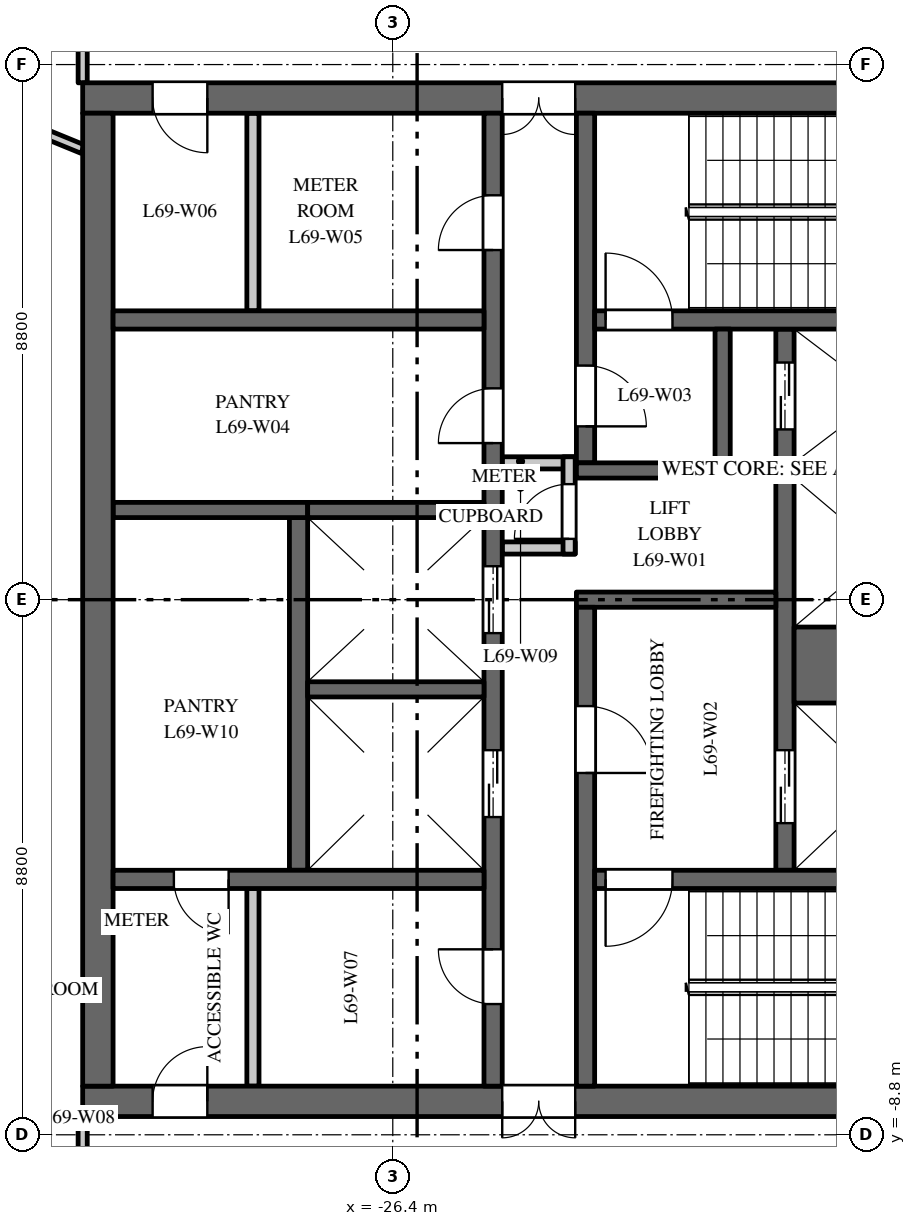
"""IFC4 building model, lengths in metres.
Left out: names, types, materials, properties, quantities, classifications, styles, units other than length and angle.
Written with IfcOpenShell. Run it as: python <this file> out.ifc"""

import sys

from ifc_helpers import new_model, si_unit, direction, frame, frame_2d, origin, place, context, subcontext, project, spatial, rectangle, extrude, element, fill, save


model = new_model("IFC4")
c1 = context("Model", 3, precision=1e-05, world=origin(), true_north=direction((0.0, 1.0)))
c2 = subcontext(c1, "Body", "Model", "MODEL_VIEW")
j1 = project(units=[si_unit("LENGTHUNIT", "METRE"), si_unit("PLANEANGLEUNIT", "RADIAN")], contexts=[c1])
p1 = place(None, origin())
s1 = spatial("IfcSite", under=j1, at=p1, CompositionType="ELEMENT")
p2 = place(p1, origin())
s2 = spatial("IfcBuilding", under=s1, at=p2, CompositionType="ELEMENT")
p3 = place(p2, frame((0.0, 0.0, 319.0)))
s3 = spatial("IfcBuildingStorey", under=s2, at=p3, CompositionType="ELEMENT", Elevation=319.0)
p4 = place(p3, frame((-16.5, 8.25, 0.0), z_axis=(0.0, 0.0, 1.0), x_axis=(-1.0, 0.0, 0.0)))
e1 = element("IfcWall", 1, at=p4, inside=s3, PredefinedType="SHEAR", context=c2, shape_type="SweptSolid", body=[
    extrude(rectangle(XDim=15.0, YDim=0.5, at=frame_2d((7.5, 0.0))), origin(), (0.0, 0.0, 1.0), 3.7),
])
p5 = place(p4, frame((6.9, 0.0, 0.0)))
e2 = element("IfcOpeningElement", 2, at=p5, cuts=e1, PredefinedType="OPENING", context=c2, shape_type="SweptSolid", body=[
    extrude(rectangle(XDim=1.2, YDim=2.1, at=frame_2d((0.6, 1.05))), frame((0.0, 0.26, 0.0), z_axis=(0.0, -1.0, 0.0), x_axis=(1.0, 0.0, 0.0)), (0.0, 0.0, 1.0), 0.52),
])
p6 = place(p4, frame((12.95, 0.0, 0.0)))
e3 = element("IfcOpeningElement", 3, at=p6, cuts=e1, PredefinedType="OPENING", context=c2, shape_type="SweptSolid", body=[
    extrude(rectangle(XDim=0.9, YDim=2.1, at=frame_2d((0.45, 1.05))), frame((0.0, 0.26, 0.0), z_axis=(0.0, -1.0, 0.0), x_axis=(1.0, 0.0, 0.0)), (0.0, 0.0, 1.0), 0.52),
])
p7 = place(p3, frame((-16.5, -8.25, 0.0), z_axis=(0.0, 0.0, 1.0), x_axis=(-1.0, 0.0, 0.0)))
e4 = element("IfcWall", 4, at=p7, inside=s3, PredefinedType="SHEAR", context=c2, shape_type="SweptSolid", body=[
    extrude(rectangle(XDim=15.0, YDim=0.5, at=frame_2d((7.5, 0.0))), origin(), (0.0, 0.0, 1.0), 3.7),
])
p8 = place(p7, frame((6.9, 0.0, 0.0)))
e5 = element("IfcOpeningElement", 5, at=p8, cuts=e4, PredefinedType="OPENING", context=c2, shape_type="SweptSolid", body=[
    extrude(rectangle(XDim=1.2, YDim=2.1, at=frame_2d((0.6, 1.05))), frame((0.0, 0.26, 0.0), z_axis=(0.0, -1.0, 0.0), x_axis=(1.0, 0.0, 0.0)), (0.0, 0.0, 1.0), 0.52),
])
p9 = place(p7, frame((12.95, 0.0, 0.0)))
e6 = element("IfcOpeningElement", 6, at=p9, cuts=e4, PredefinedType="OPENING", context=c2, shape_type="SweptSolid", body=[
    extrude(rectangle(XDim=0.9, YDim=2.1, at=frame_2d((0.45, 1.05))), frame((0.0, 0.26, 0.0), z_axis=(0.0, -1.0, 0.0), x_axis=(1.0, 0.0, 0.0)), (0.0, 0.0, 1.0), 0.52),
])
p10 = place(p3, frame((-27.95, -4.45, 0.0), z_axis=(0.0, 0.0, 1.0), x_axis=(0.0, 1.0, 0.0)))
e7 = element("IfcWall", 7, at=p10, inside=s3, PredefinedType="SHEAR", context=c2, shape_type="SweptSolid", body=[
    extrude(rectangle(XDim=5.8, YDim=0.3, at=frame_2d((2.9, 0.0))), origin(), (0.0, 0.0, 1.0), 3.7),
])
p11 = place(p3, frame((-27.8, 1.475, 0.0), z_axis=(0.0, 0.0, 1.0), x_axis=(-1.0, 0.0, 0.0)))
e8 = element("IfcWall", 8, at=p11, inside=s3, PredefinedType="SHEAR", context=c2, shape_type="SweptSolid", body=[
    extrude(rectangle(XDim=3.2, YDim=0.25, at=frame_2d((1.6, 0.0))), origin(), (0.0, 0.0, 1.0), 3.7),
])
p12 = place(p3, frame((-19.95, -4.45, 0.0), z_axis=(0.0, 0.0, 1.0), x_axis=(0.0, 1.0, 0.0)))
e9 = element("IfcWall", 9, at=p12, inside=s3, PredefinedType="SHEAR", context=c2, shape_type="SweptSolid", body=[
    extrude(rectangle(XDim=8.9, YDim=0.3, at=frame_2d((4.45, 0.0))), origin(), (0.0, 0.0, 1.0), 3.7),
])
p13 = place(p12, frame((0.775, 0.0, 0.0)))
e10 = element("IfcOpeningElement", 10, at=p13, cuts=e9, PredefinedType="OPENING", context=c2, shape_type="SweptSolid", body=[
    extrude(rectangle(XDim=1.2, YDim=2.1, at=frame_2d((0.6, 1.05))), frame((0.0, 0.16, 0.0), z_axis=(0.0, -1.0, 0.0), x_axis=(1.0, 0.0, 0.0)), (0.0, 0.0, 1.0), 0.32),
])
p14 = place(p12, frame((7.25, 0.0, 0.0)))
e11 = element("IfcOpeningElement", 11, at=p14, cuts=e9, PredefinedType="OPENING", context=c2, shape_type="SweptSolid", body=[
    extrude(rectangle(XDim=1.1, YDim=2.1, at=frame_2d((0.55, 1.05))), frame((0.0, 0.16, 0.0), z_axis=(0.0, -1.0, 0.0), x_axis=(1.0, 0.0, 0.0)), (0.0, 0.0, 1.0), 0.32),
])
p15 = place(p3, frame((-24.75, -8.0, 0.0), z_axis=(0.0, 0.0, 1.0), x_axis=(0.0, 1.0, 0.0)))
e12 = element("IfcWall", 12, at=p15, inside=s3, PredefinedType="SHEAR", context=c2, shape_type="SweptSolid", body=[
    extrude(rectangle(XDim=16.0, YDim=0.3, at=frame_2d((8.0, 0.0))), origin(), (0.0, 0.0, 1.0), 3.7),
])
p16 = place(p15, frame((4.425, 0.0, 0.0)))
e13 = element("IfcOpeningElement", 13, at=p16, cuts=e12, PredefinedType="OPENING", context=c2, shape_type="SweptSolid", body=[
    extrude(rectangle(XDim=1.1, YDim=2.1, at=frame_2d((0.55, 1.05))), frame((0.0, 0.16, 0.0), z_axis=(0.0, -1.0, 0.0), x_axis=(1.0, 0.0, 0.0)), (0.0, 0.0, 1.0), 0.32),
])
p17 = place(p15, frame((7.45, 0.0, 0.0)))
e14 = element("IfcOpeningElement", 14, at=p17, cuts=e12, PredefinedType="OPENING", context=c2, shape_type="SweptSolid", body=[
    extrude(rectangle(XDim=1.1, YDim=2.1, at=frame_2d((0.55, 1.05))), frame((0.0, 0.16, 0.0), z_axis=(0.0, -1.0, 0.0), x_axis=(1.0, 0.0, 0.0)), (0.0, 0.0, 1.0), 0.32),
])
p18 = place(p15, frame((10.575, 0.0, 0.0)))
e15 = element("IfcOpeningElement", 15, at=p18, cuts=e12, PredefinedType="OPENING", context=c2, shape_type="SweptSolid", body=[
    extrude(rectangle(XDim=0.9, YDim=2.1, at=frame_2d((0.45, 1.05))), frame((0.0, 0.16, 0.0), z_axis=(0.0, -1.0, 0.0), x_axis=(1.0, 0.0, 0.0)), (0.0, 0.0, 1.0), 0.32),
])
p19 = place(p15, frame((13.75, 0.0, 0.0)))
e16 = element("IfcOpeningElement", 16, at=p19, cuts=e12, PredefinedType="OPENING", context=c2, shape_type="SweptSolid", body=[
    extrude(rectangle(XDim=0.9, YDim=2.1, at=frame_2d((0.45, 1.05))), frame((0.0, 0.16, 0.0), z_axis=(0.0, -1.0, 0.0), x_axis=(1.0, 0.0, 0.0)), (0.0, 0.0, 1.0), 0.32),
])
p20 = place(p15, frame((1.35, 0.0, 0.0)))
e17 = element("IfcOpeningElement", 17, at=p20, cuts=e12, PredefinedType="OPENING", context=c2, shape_type="SweptSolid", body=[
    extrude(rectangle(XDim=0.9, YDim=2.1, at=frame_2d((0.45, 1.05))), frame((0.0, 0.16, 0.0), z_axis=(0.0, -1.0, 0.0), x_axis=(1.0, 0.0, 0.0)), (0.0, 0.0, 1.0), 0.32),
])
p21 = place(p3, frame((-20.1, 0.0, 0.0), z_axis=(0.0, 0.0, 1.0), x_axis=(-1.0, 0.0, 0.0)))
e18 = element("IfcWall", 18, at=p21, inside=s3, PredefinedType="SHEAR", context=c2, shape_type="SweptSolid", body=[
    extrude(rectangle(XDim=3.28, YDim=0.25, at=frame_2d((1.64, 0.0))), origin(), (0.0, 0.0, 1.0), 3.7),
])
for number, where, z_axis, x_axis in (
    (19, (-23.4, 0.85, 0.0), (0.0, 0.0, 1.0), (-1.0, 0.0, 0.0)),
    (20, (-23.4, 2.25, 0.0), (0.0, 0.0, 1.0), (-1.0, 0.0, 0.0)),
):
    element("IfcWall", number, at=place(p3, frame(where, z_axis=z_axis, x_axis=x_axis)), inside=s3, PredefinedType="PARTITIONING", context=c2, shape_type="SweptSolid", body=[
        extrude(rectangle(XDim=1.2, YDim=0.2, at=frame_2d((0.6, 0.0))), origin(), (0.0, 0.0, 1.0), 3.7),
    ])
p22 = place(p3, frame((-23.5, 0.75, 0.0), z_axis=(0.0, 0.0, 1.0), x_axis=(0.0, 1.0, 0.0)))
e21 = element("IfcWall", 21, at=p22, inside=s3, PredefinedType="PARTITIONING", context=c2, shape_type="SweptSolid", body=[
    extrude(rectangle(XDim=1.6, YDim=0.2, at=frame_2d((0.8, 0.0))), origin(), (0.0, 0.0, 1.0), 3.7),
])
p23 = place(p22, frame((0.25, 0.0, 0.0)))
e22 = element("IfcOpeningElement", 22, at=p23, cuts=e21, PredefinedType="OPENING", context=c2, shape_type="SweptSolid", body=[
    extrude(rectangle(XDim=0.9, YDim=2.1, at=frame_2d((0.45, 1.05))), frame((0.0, 0.11, 0.0), z_axis=(0.0, -1.0, 0.0), x_axis=(1.0, 0.0, 0.0)), (0.0, 0.0, 1.0), 0.22),
])
p24 = place(p3, frame((-31.25, -8.0, 0.0), z_axis=(0.0, 0.0, 1.0), x_axis=(0.0, 1.0, 0.0)))
e23 = element("IfcWall", 23, at=p24, inside=s3, PredefinedType="SHEAR", context=c2, shape_type="SweptSolid", body=[
    extrude(rectangle(XDim=16.0, YDim=0.5, at=frame_2d((8.0, 0.0))), origin(), (0.0, 0.0, 1.0), 3.7),
])
p25 = place(p3, frame((-24.9, 4.6, 0.0), z_axis=(0.0, 0.0, 1.0), x_axis=(-1.0, 0.0, 0.0)))
e24 = element("IfcWall", 24, at=p25, inside=s3, PredefinedType="SHEAR", context=c2, shape_type="SweptSolid", body=[
    extrude(rectangle(XDim=6.1, YDim=0.3, at=frame_2d((3.05, 0.0))), origin(), (0.0, 0.0, 1.0), 3.7),
])
for number, where, z_axis, x_axis in (
    (25, (-28.7, 4.75, 0.0), (0.0, 0.0, 1.0), (0.0, 1.0, 0.0)),
    (26, (-28.7, -8.0, 0.0), (0.0, 0.0, 1.0), (0.0, 1.0, 0.0)),
):
    element("IfcWall", number, at=place(p3, frame(where, z_axis=z_axis, x_axis=x_axis)), inside=s3, PredefinedType="PARTITIONING", context=c2, shape_type="SweptSolid", body=[
        extrude(rectangle(XDim=3.25, YDim=0.2, at=frame_2d((1.625, 0.0))), origin(), (0.0, 0.0, 1.0), 3.7),
    ])
p26 = place(p3, frame((-24.9, -4.6, 0.0), z_axis=(0.0, 0.0, 1.0), x_axis=(-1.0, 0.0, 0.0)))
e27 = element("IfcWall", 27, at=p26, inside=s3, PredefinedType="SHEAR", context=c2, shape_type="SweptSolid", body=[
    extrude(rectangle(XDim=6.1, YDim=0.3, at=frame_2d((3.05, 0.0))), origin(), (0.0, 0.0, 1.0), 3.7),
])
p27 = place(p26, frame((4.2, 0.0, 0.0)))
e28 = element("IfcOpeningElement", 28, at=p27, cuts=e27, PredefinedType="OPENING", context=c2, shape_type="SweptSolid", body=[
    extrude(rectangle(XDim=0.9, YDim=2.1, at=frame_2d((0.45, 1.05))), frame((0.0, 0.16, 0.0), z_axis=(0.0, -1.0, 0.0), x_axis=(1.0, 0.0, 0.0)), (0.0, 0.0, 1.0), 0.32),
])
p28 = place(p3, frame((-16.9, -1.075, 0.0), z_axis=(0.0, 0.0, 1.0), x_axis=(-1.0, 0.0, 0.0)))
e29 = element("IfcWall", 29, at=p28, inside=s3, PredefinedType="SHEAR", context=c2, shape_type="SweptSolid", body=[
    extrude(rectangle(XDim=2.9, YDim=1.25, at=frame_2d((1.45, 0.0))), origin(), (0.0, 0.0, 1.0), 3.7),
])
for number, where, z_axis, x_axis in (
    (30, (-16.9, 2.125, 0.0), (0.0, 0.0, 1.0), (-1.0, 0.0, 0.0)),
    (31, (-24.9, -1.475, 0.0), (0.0, 0.0, 1.0), (-1.0, 0.0, 0.0)),
    (32, (-24.9, 1.475, 0.0), (0.0, 0.0, 1.0), (-1.0, 0.0, 0.0)),
):
    element("IfcWall", number, at=place(p3, frame(where, z_axis=z_axis, x_axis=x_axis)), inside=s3, PredefinedType="SHEAR", context=c2, shape_type="SweptSolid", body=[
        extrude(rectangle(XDim=2.9, YDim=0.25, at=frame_2d((1.45, 0.0))), origin(), (0.0, 0.0, 1.0), 3.7),
    ])
p29 = place(p3, frame((-23.23, 2.25, 0.0), z_axis=(0.0, 0.0, 1.0), x_axis=(0.0, 1.0, 0.0)))
e33 = element("IfcWall", 33, at=p29, inside=s3, PredefinedType="SHEAR", context=c2, shape_type="SweptSolid", body=[
    extrude(rectangle(XDim=5.75, YDim=0.3, at=frame_2d((2.875, 0.0))), origin(), (0.0, 0.0, 1.0), 3.7),
])
p30 = place(p29, frame((0.6, 0.0, 0.0)))
e34 = element("IfcOpeningElement", 34, at=p30, cuts=e33, PredefinedType="OPENING", context=c2, shape_type="SweptSolid", body=[
    extrude(rectangle(XDim=1.0, YDim=2.1, at=frame_2d((0.5, 1.05))), frame((0.0, 0.16, 0.0), z_axis=(0.0, -1.0, 0.0), x_axis=(1.0, 0.0, 0.0)), (0.0, 0.0, 1.0), 0.32),
])
p31 = place(p3, frame((-23.23, -8.0, 0.0), z_axis=(0.0, 0.0, 1.0), x_axis=(0.0, 1.0, 0.0)))
e35 = element("IfcWall", 35, at=p31, inside=s3, PredefinedType="SHEAR", context=c2, shape_type="SweptSolid", body=[
    extrude(rectangle(XDim=7.875, YDim=0.3, at=frame_2d((3.938, 0.0))), origin(), (0.0, 0.0, 1.0), 3.7),
])
p32 = place(p31, frame((5.15, 0.0, 0.0)))
e36 = element("IfcOpeningElement", 36, at=p32, cuts=e35, PredefinedType="OPENING", context=c2, shape_type="SweptSolid", body=[
    extrude(rectangle(XDim=1.1, YDim=2.1, at=frame_2d((0.55, 1.05))), frame((0.0, 0.16, 0.0), z_axis=(0.0, -1.0, 0.0), x_axis=(1.0, 0.0, 0.0)), (0.0, 0.0, 1.0), 0.32),
])
p33 = place(p3, frame((-16.9, 4.6, 0.0), z_axis=(0.0, 0.0, 1.0), x_axis=(-1.0, 0.0, 0.0)))
e37 = element("IfcWall", 37, at=p33, inside=s3, PredefinedType="SHEAR", context=c2, shape_type="SweptSolid", body=[
    extrude(rectangle(XDim=6.18, YDim=0.3, at=frame_2d((3.09, 0.0))), origin(), (0.0, 0.0, 1.0), 3.7),
])
p34 = place(p33, frame((4.9, 0.0, 0.0)))
e38 = element("IfcOpeningElement", 38, at=p34, cuts=e37, PredefinedType="OPENING", context=c2, shape_type="SweptSolid", body=[
    extrude(rectangle(XDim=1.1, YDim=2.1, at=frame_2d((0.55, 1.05))), frame((0.0, 0.16, 0.0), z_axis=(0.0, -1.0, 0.0), x_axis=(1.0, 0.0, 0.0)), (0.0, 0.0, 1.0), 0.32),
])
p35 = place(p3, frame((-16.9, -4.6, 0.0), z_axis=(0.0, 0.0, 1.0), x_axis=(-1.0, 0.0, 0.0)))
e39 = element("IfcWall", 39, at=p35, inside=s3, PredefinedType="SHEAR", context=c2, shape_type="SweptSolid", body=[
    extrude(rectangle(XDim=6.18, YDim=0.3, at=frame_2d((3.09, 0.0))), origin(), (0.0, 0.0, 1.0), 3.7),
])
p36 = place(p35, frame((4.9, 0.0, 0.0)))
e40 = element("IfcOpeningElement", 40, at=p36, cuts=e39, PredefinedType="OPENING", context=c2, shape_type="SweptSolid", body=[
    extrude(rectangle(XDim=1.1, YDim=2.1, at=frame_2d((0.55, 1.05))), frame((0.0, 0.16, 0.0), z_axis=(0.0, -1.0, 0.0), x_axis=(1.0, 0.0, 0.0)), (0.0, 0.0, 1.0), 0.32),
])
p37 = place(p3, frame((-20.85, 2.125, 0.0), z_axis=(0.0, 0.0, 1.0), x_axis=(-1.0, 0.0, 0.0)))
e41 = element("IfcWall", 41, at=p37, inside=s3, PredefinedType="SHEAR", context=c2, shape_type="SweptSolid", body=[
    extrude(rectangle(XDim=2.53, YDim=0.25, at=frame_2d((1.265, 0.0))), origin(), (0.0, 0.0, 1.0), 3.7),
])
p38 = place(p3, frame((-20.975, 2.25, 0.0), z_axis=(0.0, 0.0, 1.0), x_axis=(0.0, 1.0, 0.0)))
e42 = element("IfcWall", 42, at=p38, inside=s3, PredefinedType="SHEAR", context=c2, shape_type="SweptSolid", body=[
    extrude(rectangle(XDim=2.2, YDim=0.25, at=frame_2d((1.1, 0.0))), origin(), (0.0, 0.0, 1.0), 3.7),
])
p39 = place(p3, frame((-34.234, 8.53, 0.0), z_axis=(0.0, 0.0, 1.0), x_axis=(0.925344112436, -0.379128307542, 0.0)))
e43 = element("IfcWall", 43, at=p39, inside=s3, PredefinedType="PARTITIONING", context=c2, shape_type="SweptSolid", body=[
    extrude(rectangle(XDim=2.954, YDim=0.15, at=frame_2d((1.477, 0.0))), origin(), (0.0, 0.0, 1.0), 3.0),
])
for number, where, z_axis, x_axis in (
    (44, (-31.5, -10.7, 0.0), (0.0, 0.0, 1.0), (0.0, 1.0, 0.0)),
    (45, (-31.5, 8.5, 0.0), (0.0, 0.0, 1.0), (0.0, 1.0, 0.0)),
):
    element("IfcWall", number, at=place(p3, frame(where, z_axis=z_axis, x_axis=x_axis)), inside=s3, PredefinedType="PARTITIONING", context=c2, shape_type="SweptSolid", body=[
        extrude(rectangle(XDim=2.2, YDim=0.15, at=frame_2d((1.1, 0.0))), origin(), (0.0, 0.0, 1.0), 3.7),
    ])
p40 = place(p13, origin())
e46 = element("IfcDoor", 46, at=p40, inside=s3, OperationType="DOUBLE_DOOR_SLIDING", PredefinedType="DOOR", context=c2, shape_type="SweptSolid", body=[
    extrude(rectangle(XDim=1.2, YDim=2.1, at=frame_2d((0.6, 1.05))), frame((0.0, 0.025, 0.0), z_axis=(0.0, -1.0, 0.0), x_axis=(1.0, 0.0, 0.0)), (0.0, 0.0, 1.0), 0.05),
])
fill(e10, e46)
p41 = place(p14, origin())
e47 = element("IfcDoor", 47, at=p41, inside=s3, OperationType="DOUBLE_DOOR_SLIDING", PredefinedType="DOOR", context=c2, shape_type="SweptSolid", body=[
    extrude(rectangle(XDim=1.1, YDim=2.1, at=frame_2d((0.55, 1.05))), frame((0.0, 0.025, 0.0), z_axis=(0.0, -1.0, 0.0), x_axis=(1.0, 0.0, 0.0)), (0.0, 0.0, 1.0), 0.05),
])
fill(e11, e47)
p42 = place(p16, origin())
e48 = element("IfcDoor", 48, at=p42, inside=s3, OperationType="DOUBLE_DOOR_SLIDING", PredefinedType="DOOR", context=c2, shape_type="SweptSolid", body=[
    extrude(rectangle(XDim=1.1, YDim=2.1, at=frame_2d((0.55, 1.05))), frame((0.0, 0.025, 0.0), z_axis=(0.0, -1.0, 0.0), x_axis=(1.0, 0.0, 0.0)), (0.0, 0.0, 1.0), 0.05),
])
fill(e13, e48)
p43 = place(p17, origin())
e49 = element("IfcDoor", 49, at=p43, inside=s3, OperationType="DOUBLE_DOOR_SLIDING", PredefinedType="DOOR", context=c2, shape_type="SweptSolid", body=[
    extrude(rectangle(XDim=1.1, YDim=2.1, at=frame_2d((0.55, 1.05))), frame((0.0, 0.025, 0.0), z_axis=(0.0, -1.0, 0.0), x_axis=(1.0, 0.0, 0.0)), (0.0, 0.0, 1.0), 0.05),
])
fill(e14, e49)
p44 = place(p34, origin())
e50 = element("IfcDoor", 50, at=p44, inside=s3, OperationType="SINGLE_SWING_RIGHT", PredefinedType="DOOR", context=c2, shape_type="SweptSolid", body=[
    extrude(rectangle(XDim=1.1, YDim=2.1, at=frame_2d((0.55, 1.05))), frame((0.0, 0.025, 0.0), z_axis=(0.0, -1.0, 0.0), x_axis=(1.0, 0.0, 0.0)), (0.0, 0.0, 1.0), 0.05),
])
fill(e38, e50)
p45 = place(p36, origin())
e51 = element("IfcDoor", 51, at=p45, inside=s3, OperationType="SINGLE_SWING_LEFT", PredefinedType="DOOR", context=c2, shape_type="SweptSolid", body=[
    extrude(rectangle(XDim=1.1, YDim=2.1, at=frame_2d((0.55, 1.05))), frame((0.0, 0.025, 0.0), z_axis=(0.0, -1.0, 0.0), x_axis=(1.0, 0.0, 0.0)), (0.0, 0.0, 1.0), 0.05),
])
fill(e40, e51)
p46 = place(p32, origin())
e52 = element("IfcDoor", 52, at=p46, inside=s3, OperationType="SINGLE_SWING_LEFT", PredefinedType="DOOR", context=c2, shape_type="SweptSolid", body=[
    extrude(rectangle(XDim=1.1, YDim=2.1, at=frame_2d((0.55, 1.05))), frame((0.0, 0.025, 0.0), z_axis=(0.0, -1.0, 0.0), x_axis=(1.0, 0.0, 0.0)), (0.0, 0.0, 1.0), 0.05),
])
fill(e36, e52)
p47 = place(p30, origin())
e53 = element("IfcDoor", 53, at=p47, inside=s3, OperationType="SINGLE_SWING_LEFT", PredefinedType="DOOR", context=c2, shape_type="SweptSolid", body=[
    extrude(rectangle(XDim=1.0, YDim=2.1, at=frame_2d((0.5, 1.05))), frame((0.0, 0.025, 0.0), z_axis=(0.0, -1.0, 0.0), x_axis=(1.0, 0.0, 0.0)), (0.0, 0.0, 1.0), 0.05),
])
fill(e34, e53)
p48 = place(p5, origin())
e54 = element("IfcDoor", 54, at=p48, inside=s3, OperationType="DOUBLE_DOOR_DOUBLE_SWING", PredefinedType="DOOR", context=c2, shape_type="SweptSolid", body=[
    extrude(rectangle(XDim=1.2, YDim=2.1, at=frame_2d((0.6, 1.05))), frame((0.0, 0.025, 0.0), z_axis=(0.0, -1.0, 0.0), x_axis=(1.0, 0.0, 0.0)), (0.0, 0.0, 1.0), 0.05),
])
fill(e2, e54)
p49 = place(p8, origin())
e55 = element("IfcDoor", 55, at=p49, inside=s3, OperationType="DOUBLE_DOOR_DOUBLE_SWING", PredefinedType="DOOR", context=c2, shape_type="SweptSolid", body=[
    extrude(rectangle(XDim=1.2, YDim=2.1, at=frame_2d((0.6, 1.05))), frame((0.0, 0.025, 0.0), z_axis=(0.0, -1.0, 0.0), x_axis=(1.0, 0.0, 0.0)), (0.0, 0.0, 1.0), 0.05),
])
fill(e5, e55)
p50 = place(p18, origin())
e56 = element("IfcDoor", 56, at=p50, inside=s3, OperationType="SINGLE_SWING_RIGHT", PredefinedType="DOOR", context=c2, shape_type="SweptSolid", body=[
    extrude(rectangle(XDim=0.9, YDim=2.1, at=frame_2d((0.45, 1.05))), frame((0.0, 0.025, 0.0), z_axis=(0.0, -1.0, 0.0), x_axis=(1.0, 0.0, 0.0)), (0.0, 0.0, 1.0), 0.05),
])
fill(e15, e56)
p51 = place(p19, origin())
e57 = element("IfcDoor", 57, at=p51, inside=s3, OperationType="SINGLE_SWING_RIGHT", PredefinedType="DOOR", context=c2, shape_type="SweptSolid", body=[
    extrude(rectangle(XDim=0.9, YDim=2.1, at=frame_2d((0.45, 1.05))), frame((0.0, 0.025, 0.0), z_axis=(0.0, -1.0, 0.0), x_axis=(1.0, 0.0, 0.0)), (0.0, 0.0, 1.0), 0.05),
])
fill(e16, e57)
p52 = place(p6, origin())
e58 = element("IfcDoor", 58, at=p52, inside=s3, OperationType="SINGLE_SWING_RIGHT", PredefinedType="DOOR", context=c2, shape_type="SweptSolid", body=[
    extrude(rectangle(XDim=0.9, YDim=2.1, at=frame_2d((0.45, 1.05))), frame((0.0, 0.025, 0.0), z_axis=(0.0, -1.0, 0.0), x_axis=(1.0, 0.0, 0.0)), (0.0, 0.0, 1.0), 0.05),
])
fill(e3, e58)
p53 = place(p20, origin())
e59 = element("IfcDoor", 59, at=p53, inside=s3, OperationType="SINGLE_SWING_LEFT", PredefinedType="DOOR", context=c2, shape_type="SweptSolid", body=[
    extrude(rectangle(XDim=0.9, YDim=2.1, at=frame_2d((0.45, 1.05))), frame((0.0, 0.025, 0.0), z_axis=(0.0, -1.0, 0.0), x_axis=(1.0, 0.0, 0.0)), (0.0, 0.0, 1.0), 0.05),
])
fill(e17, e59)
p54 = place(p9, origin())
e60 = element("IfcDoor", 60, at=p54, inside=s3, OperationType="SINGLE_SWING_LEFT", PredefinedType="DOOR", context=c2, shape_type="SweptSolid", body=[
    extrude(rectangle(XDim=0.9, YDim=2.1, at=frame_2d((0.45, 1.05))), frame((0.0, 0.025, 0.0), z_axis=(0.0, -1.0, 0.0), x_axis=(1.0, 0.0, 0.0)), (0.0, 0.0, 1.0), 0.05),
])
fill(e6, e60)
p55 = place(p23, origin())
e61 = element("IfcDoor", 61, at=p55, inside=s3, OperationType="SINGLE_SWING_RIGHT", PredefinedType="DOOR", context=c2, shape_type="SweptSolid", body=[
    extrude(rectangle(XDim=0.9, YDim=2.1, at=frame_2d((0.45, 1.05))), frame((0.0, 0.025, 0.0), z_axis=(0.0, -1.0, 0.0), x_axis=(1.0, 0.0, 0.0)), (0.0, 0.0, 1.0), 0.05),
])
fill(e22, e61)
p56 = place(p27, origin())
e62 = element("IfcDoor", 62, at=p56, inside=s3, OperationType="SINGLE_SWING_RIGHT", PredefinedType="DOOR", context=c2, shape_type="SweptSolid", body=[
    extrude(rectangle(XDim=0.9, YDim=2.1, at=frame_2d((0.45, 1.05))), frame((0.0, 0.025, 0.0), z_axis=(0.0, -1.0, 0.0), x_axis=(1.0, 0.0, 0.0)), (0.0, 0.0, 1.0), 0.05),
])
fill(e28, e62)
save(model, sys.argv[1])
